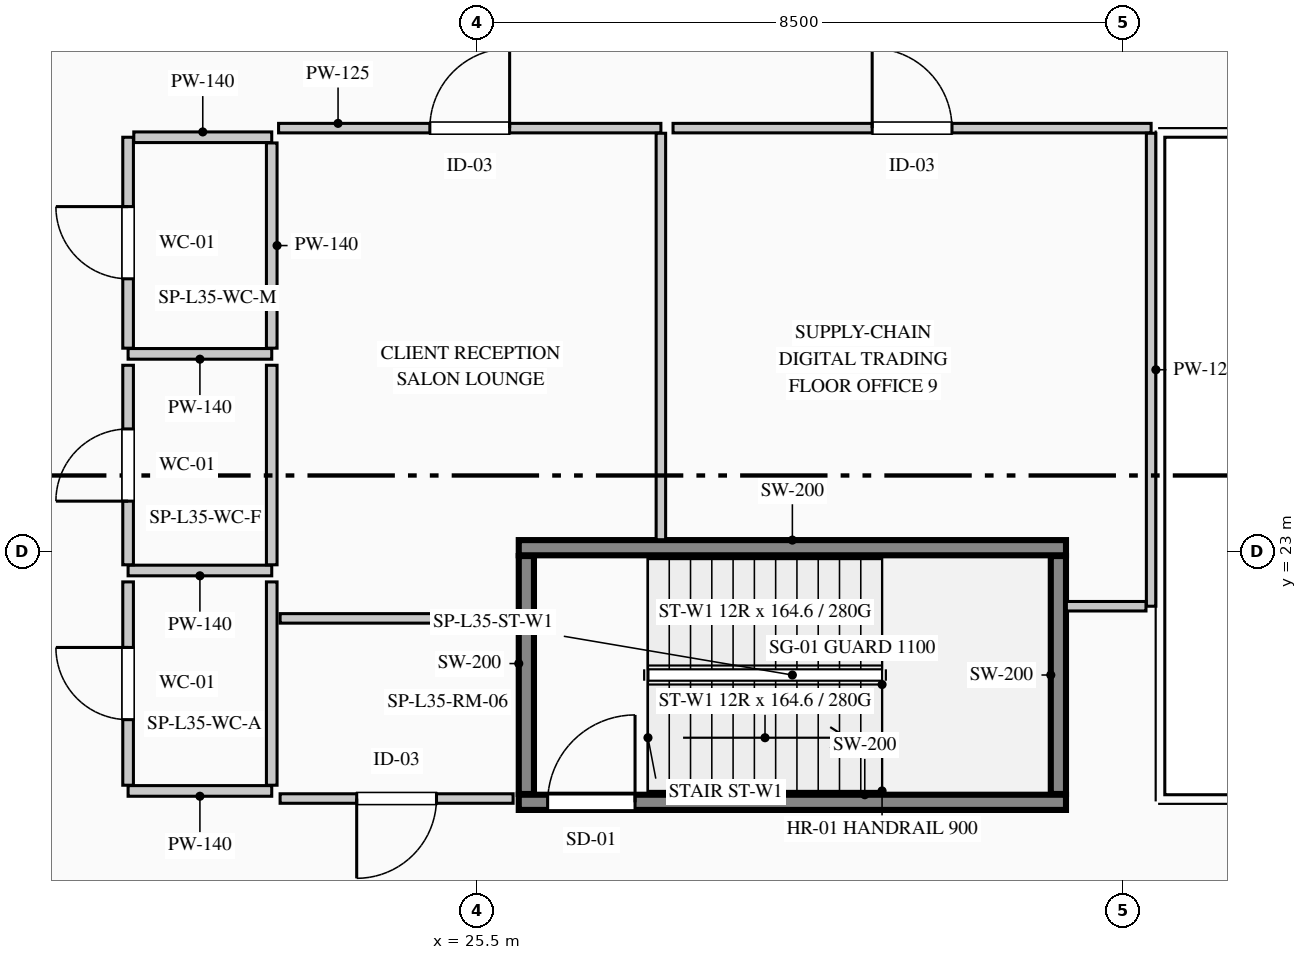
"""IFC4 building model, lengths in metres.
Left out: names, types, materials, properties, quantities, classifications, styles, units other than length and angle.
Written with IfcOpenShell. Run it as: python <this file> out.ifc"""

import sys

from ifc_helpers import new_model, si_unit, direction, frame, frame_2d, origin, place, context, subcontext, project, spatial, rectangle, extrude, element, fill, save


model = new_model("IFC4")
c1 = context("Model", 3, precision=1e-05, world=origin(), true_north=direction((0.0, 1.0)))
c2 = subcontext(c1, "Body", "Model", "MODEL_VIEW")
j1 = project(units=[si_unit("LENGTHUNIT", "METRE"), si_unit("PLANEANGLEUNIT", "RADIAN")], contexts=[c1])
p1 = place(None, origin())
s1 = spatial("IfcSite", under=j1, at=p1, CompositionType="ELEMENT")
p2 = place(p1, origin())
s2 = spatial("IfcBuilding", under=s1, at=p2, CompositionType="ELEMENT")
p3 = place(p2, frame((0.0, 0.0, 150.9)))
s3 = spatial("IfcBuildingStorey", under=s2, at=p3, CompositionType="ELEMENT", Elevation=150.9)
p4 = place(p3, frame((26.05, 19.7, 0.0), z_axis=(0.0, 0.0, 1.0), x_axis=(1.0, 0.0, 0.0)))
e1 = element("IfcWall", 1, at=p4, inside=s3, PredefinedType="SHEAR", context=c2, shape_type="SweptSolid", body=[
    extrude(rectangle(XDim=7.2, YDim=0.2, at=frame_2d((3.6, 0.0))), origin(), (0.0, 0.0, 1.0), 3.95),
])
p5 = place(p4, frame((0.38, 0.0, 0.0)))
e2 = element("IfcOpeningElement", 2, at=p5, cuts=e1, PredefinedType="OPENING", context=c2, shape_type="SweptSolid", body=[
    extrude(rectangle(XDim=1.15, YDim=2.2, at=frame_2d((0.575, 1.1))), frame((0.0, 0.11, 0.0), z_axis=(0.0, -1.0, 0.0), x_axis=(1.0, 0.0, 0.0)), (0.0, 0.0, 1.0), 0.22),
])
p6 = place(p3, frame((26.05, 23.05, 0.0), z_axis=(0.0, 0.0, 1.0), x_axis=(1.0, 0.0, 0.0)))
e3 = element("IfcWall", 3, at=p6, inside=s3, PredefinedType="SHEAR", context=c2, shape_type="SweptSolid", body=[
    extrude(rectangle(XDim=7.2, YDim=0.2, at=frame_2d((3.6, 0.0))), origin(), (0.0, 0.0, 1.0), 3.95),
])
for number, where, z_axis, x_axis in (
    (4, (26.15, 19.81, 0.0), (0.0, 0.0, 1.0), (0.0, 1.0, 0.0)),
    (5, (33.15, 19.81, 0.0), (0.0, 0.0, 1.0), (0.0, 1.0, 0.0)),
):
    element("IfcWall", number, at=place(p3, frame(where, z_axis=z_axis, x_axis=x_axis)), inside=s3, PredefinedType="SHEAR", context=c2, shape_type="SweptSolid", body=[
        extrude(rectangle(XDim=3.13, YDim=0.2, at=frame_2d((1.565, 0.0))), origin(), (0.0, 0.0, 1.0), 3.95),
    ])
p7 = place(p3, frame((22.8, 25.6, 0.0), z_axis=(0.0, 0.0, 1.0), x_axis=(-1.0, 0.0, 0.0)))
e6 = element("IfcWall", 6, at=p7, inside=s3, PredefinedType="PARTITIONING", context=c2, shape_type="SweptSolid", body=[
    extrude(rectangle(XDim=1.89, YDim=0.14, at=frame_2d((0.945, 0.0))), origin(), (0.0, 0.0, 1.0), 3.69),
])
p8 = place(p3, frame((20.91, 25.675, 0.0), z_axis=(0.0, 0.0, 1.0), x_axis=(0.0, 1.0, 0.0)))
e7 = element("IfcWall", 7, at=p8, inside=s3, PredefinedType="PARTITIONING", context=c2, shape_type="SweptSolid", body=[
    extrude(rectangle(XDim=2.775, YDim=0.14, at=frame_2d((1.387, 0.0))), origin(), (0.0, 0.0, 1.0), 3.69),
])
p9 = place(p8, frame((0.913, 0.0, 0.0)))
e8 = element("IfcOpeningElement", 8, at=p9, cuts=e7, PredefinedType="OPENING", context=c2, shape_type="SweptSolid", body=[
    extrude(rectangle(XDim=0.95, YDim=2.15, at=frame_2d((0.475, 1.075))), frame((0.0, 0.08, 0.0), z_axis=(0.0, -1.0, 0.0), x_axis=(1.0, 0.0, 0.0)), (0.0, 0.0, 1.0), 0.16),
])
p10 = place(p3, frame((20.985, 28.45, 0.0), z_axis=(0.0, 0.0, 1.0), x_axis=(1.0, 0.0, 0.0)))
e9 = element("IfcWall", 9, at=p10, inside=s3, PredefinedType="PARTITIONING", context=c2, shape_type="SweptSolid", body=[
    extrude(rectangle(XDim=1.815, YDim=0.14, at=frame_2d((0.907, 0.0))), origin(), (0.0, 0.0, 1.0), 3.69),
])
p11 = place(p3, frame((22.8, 28.375, 0.0), z_axis=(0.0, 0.0, 1.0), x_axis=(0.0, -1.0, 0.0)))
e10 = element("IfcWall", 10, at=p11, inside=s3, PredefinedType="PARTITIONING", context=c2, shape_type="SweptSolid", body=[
    extrude(rectangle(XDim=2.7, YDim=0.14, at=frame_2d((1.35, 0.0))), origin(), (0.0, 0.0, 1.0), 3.315),
])
p12 = place(p3, frame((22.8, 22.75, 0.0), z_axis=(0.0, 0.0, 1.0), x_axis=(-1.0, 0.0, 0.0)))
e11 = element("IfcWall", 11, at=p12, inside=s3, PredefinedType="PARTITIONING", context=c2, shape_type="SweptSolid", body=[
    extrude(rectangle(XDim=1.89, YDim=0.14, at=frame_2d((0.945, 0.0))), origin(), (0.0, 0.0, 1.0), 3.69),
])
p13 = place(p3, frame((20.91, 22.825, 0.0), z_axis=(0.0, 0.0, 1.0), x_axis=(0.0, 1.0, 0.0)))
e12 = element("IfcWall", 12, at=p13, inside=s3, PredefinedType="PARTITIONING", context=c2, shape_type="SweptSolid", body=[
    extrude(rectangle(XDim=2.625, YDim=0.14, at=frame_2d((1.312, 0.0))), origin(), (0.0, 0.0, 1.0), 3.69),
])
p14 = place(p13, frame((0.837, 0.0, 0.0)))
e13 = element("IfcOpeningElement", 13, at=p14, cuts=e12, PredefinedType="OPENING", context=c2, shape_type="SweptSolid", body=[
    extrude(rectangle(XDim=0.95, YDim=2.15, at=frame_2d((0.475, 1.075))), frame((0.0, 0.08, 0.0), z_axis=(0.0, -1.0, 0.0), x_axis=(1.0, 0.0, 0.0)), (0.0, 0.0, 1.0), 0.16),
])
p15 = place(p3, frame((22.8, 25.45, 0.0), z_axis=(0.0, 0.0, 1.0), x_axis=(0.0, -1.0, 0.0)))
e14 = element("IfcWall", 14, at=p15, inside=s3, PredefinedType="PARTITIONING", context=c2, shape_type="SweptSolid", body=[
    extrude(rectangle(XDim=2.625, YDim=0.14, at=frame_2d((1.312, 0.0))), origin(), (0.0, 0.0, 1.0), 3.315),
])
p16 = place(p3, frame((22.8, 19.85, 0.0), z_axis=(0.0, 0.0, 1.0), x_axis=(-1.0, 0.0, 0.0)))
e15 = element("IfcWall", 15, at=p16, inside=s3, PredefinedType="PARTITIONING", context=c2, shape_type="SweptSolid", body=[
    extrude(rectangle(XDim=1.89, YDim=0.14, at=frame_2d((0.945, 0.0))), origin(), (0.0, 0.0, 1.0), 3.69),
])
p17 = place(p3, frame((20.91, 19.925, 0.0), z_axis=(0.0, 0.0, 1.0), x_axis=(0.0, 1.0, 0.0)))
e16 = element("IfcWall", 16, at=p17, inside=s3, PredefinedType="PARTITIONING", context=c2, shape_type="SweptSolid", body=[
    extrude(rectangle(XDim=2.675, YDim=0.14, at=frame_2d((1.337, 0.0))), origin(), (0.0, 0.0, 1.0), 3.69),
])
p18 = place(p17, frame((0.863, 0.0, 0.0)))
e17 = element("IfcOpeningElement", 17, at=p18, cuts=e16, PredefinedType="OPENING", context=c2, shape_type="SweptSolid", body=[
    extrude(rectangle(XDim=0.95, YDim=2.15, at=frame_2d((0.475, 1.075))), frame((0.0, 0.08, 0.0), z_axis=(0.0, -1.0, 0.0), x_axis=(1.0, 0.0, 0.0)), (0.0, 0.0, 1.0), 0.16),
])
p19 = place(p3, frame((22.8, 22.6, 0.0), z_axis=(0.0, 0.0, 1.0), x_axis=(0.0, -1.0, 0.0)))
e18 = element("IfcWall", 18, at=p19, inside=s3, PredefinedType="PARTITIONING", context=c2, shape_type="SweptSolid", body=[
    extrude(rectangle(XDim=2.675, YDim=0.14, at=frame_2d((1.337, 0.0))), origin(), (0.0, 0.0, 1.0), 3.315),
])
p20 = place(p3, frame((25.976, 19.75, 0.0), z_axis=(0.0, 0.0, 1.0), x_axis=(-1.0, 0.0, 0.0)))
e19 = element("IfcWall", 19, at=p20, inside=s3, PredefinedType="PARTITIONING", context=c2, shape_type="SweptSolid", body=[
    extrude(rectangle(XDim=3.066, YDim=0.125, at=frame_2d((1.533, 0.0))), origin(), (0.0, 0.0, 1.0), 3.69),
])
p21 = place(p20, frame((1.008, 0.0, 0.0)))
e20 = element("IfcOpeningElement", 20, at=p21, cuts=e19, PredefinedType="OPENING", context=c2, shape_type="SweptSolid", body=[
    extrude(rectangle(XDim=1.05, YDim=2.15, at=frame_2d((0.525, 1.075))), frame((0.0, 0.073, 0.0), z_axis=(0.0, -1.0, 0.0), x_axis=(1.0, 0.0, 0.0)), (0.0, 0.0, 1.0), 0.145),
])
p22 = place(p3, frame((22.91, 22.12, 0.0), z_axis=(0.0, 0.0, 1.0), x_axis=(1.0, 0.0, 0.0)))
e21 = element("IfcWall", 21, at=p22, inside=s3, PredefinedType="PARTITIONING", context=c2, shape_type="SweptSolid", body=[
    extrude(rectangle(XDim=3.135, YDim=0.125, at=frame_2d((1.567, 0.0))), origin(), (0.0, 0.0, 1.0), 3.69),
])
p23 = place(p3, frame((22.89, 28.57, 0.0), z_axis=(0.0, 0.0, 1.0), x_axis=(1.0, 0.0, 0.0)))
e22 = element("IfcWall", 22, at=p23, inside=s3, PredefinedType="PARTITIONING", context=c2, shape_type="SweptSolid", body=[
    extrude(rectangle(XDim=5.03, YDim=0.125, at=frame_2d((2.515, 0.0))), origin(), (0.0, 0.0, 1.0), 3.475),
])
p24 = place(p23, frame((1.99, 0.0, 0.0)))
e23 = element("IfcOpeningElement", 23, at=p24, cuts=e22, PredefinedType="OPENING", context=c2, shape_type="SweptSolid", body=[
    extrude(rectangle(XDim=1.05, YDim=2.15, at=frame_2d((0.525, 1.075))), frame((0.0, 0.073, 0.0), z_axis=(0.0, -1.0, 0.0), x_axis=(1.0, 0.0, 0.0)), (0.0, 0.0, 1.0), 0.145),
])
p25 = place(p3, frame((27.92, 28.502, 0.0), z_axis=(0.0, 0.0, 1.0), x_axis=(0.0, -1.0, 0.0)))
e24 = element("IfcWall", 24, at=p25, inside=s3, PredefinedType="PARTITIONING", context=c2, shape_type="SweptSolid", body=[
    extrude(rectangle(XDim=5.347, YDim=0.125, at=frame_2d((2.674, 0.0))), origin(), (0.0, 0.0, 1.0), 3.69),
])
p26 = place(p3, frame((28.08, 28.57, 0.0), z_axis=(0.0, 0.0, 1.0), x_axis=(1.0, 0.0, 0.0)))
e25 = element("IfcWall", 25, at=p26, inside=s3, PredefinedType="PARTITIONING", context=c2, shape_type="SweptSolid", body=[
    extrude(rectangle(XDim=6.29, YDim=0.125, at=frame_2d((3.145, 0.0))), origin(), (0.0, 0.0, 1.0), 3.475),
])
p27 = place(p26, frame((2.62, 0.0, 0.0)))
e26 = element("IfcOpeningElement", 26, at=p27, cuts=e25, PredefinedType="OPENING", context=c2, shape_type="SweptSolid", body=[
    extrude(rectangle(XDim=1.05, YDim=2.15, at=frame_2d((0.525, 1.075))), frame((0.0, 0.073, 0.0), z_axis=(0.0, -1.0, 0.0), x_axis=(1.0, 0.0, 0.0)), (0.0, 0.0, 1.0), 0.145),
])
p28 = place(p3, frame((34.37, 28.502, 0.0), z_axis=(0.0, 0.0, 1.0), x_axis=(0.0, -1.0, 0.0)))
e27 = element("IfcWall", 27, at=p28, inside=s3, PredefinedType="PARTITIONING", context=c2, shape_type="SweptSolid", body=[
    extrude(rectangle(XDim=6.222, YDim=0.125, at=frame_2d((3.111, 0.0))), origin(), (0.0, 0.0, 1.0), 3.69),
])
p29 = place(p3, frame((34.302, 22.28, 0.0), z_axis=(0.0, 0.0, 1.0), x_axis=(-1.0, 0.0, 0.0)))
e28 = element("IfcWall", 28, at=p29, inside=s3, PredefinedType="PARTITIONING", context=c2, shape_type="SweptSolid", body=[
    extrude(rectangle(XDim=1.048, YDim=0.125, at=frame_2d((0.524, 0.0))), origin(), (0.0, 0.0, 1.0), 3.69),
])
p30 = place(p5, origin())
e29 = element("IfcDoor", 29, at=p30, inside=s3, OperationType="SINGLE_SWING_RIGHT", PredefinedType="DOOR", context=c2, shape_type="SweptSolid", body=[
    extrude(rectangle(XDim=1.15, YDim=2.2, at=frame_2d((0.575, 1.1))), frame((0.0, 0.025, 0.0), z_axis=(0.0, -1.0, 0.0), x_axis=(1.0, 0.0, 0.0)), (0.0, 0.0, 1.0), 0.05),
])
fill(e2, e29)
p31 = place(p9, origin())
e30 = element("IfcDoor", 30, at=p31, inside=s3, OperationType="SINGLE_SWING_RIGHT", PredefinedType="DOOR", context=c2, shape_type="SweptSolid", body=[
    extrude(rectangle(XDim=0.95, YDim=2.15, at=frame_2d((0.475, 1.075))), frame((0.0, 0.025, 0.0), z_axis=(0.0, -1.0, 0.0), x_axis=(1.0, 0.0, 0.0)), (0.0, 0.0, 1.0), 0.05),
])
fill(e8, e30)
p32 = place(p14, origin())
e31 = element("IfcDoor", 31, at=p32, inside=s3, OperationType="SINGLE_SWING_LEFT", PredefinedType="DOOR", context=c2, shape_type="SweptSolid", body=[
    extrude(rectangle(XDim=0.95, YDim=2.15, at=frame_2d((0.475, 1.075))), frame((0.0, 0.025, 0.0), z_axis=(0.0, -1.0, 0.0), x_axis=(1.0, 0.0, 0.0)), (0.0, 0.0, 1.0), 0.05),
])
fill(e13, e31)
p33 = place(p18, origin())
e32 = element("IfcDoor", 32, at=p33, inside=s3, OperationType="SINGLE_SWING_RIGHT", PredefinedType="DOOR", context=c2, shape_type="SweptSolid", body=[
    extrude(rectangle(XDim=0.95, YDim=2.15, at=frame_2d((0.475, 1.075))), frame((0.0, 0.025, 0.0), z_axis=(0.0, -1.0, 0.0), x_axis=(1.0, 0.0, 0.0)), (0.0, 0.0, 1.0), 0.05),
])
fill(e17, e32)
p34 = place(p21, origin())
e33 = element("IfcDoor", 33, at=p34, inside=s3, OperationType="SINGLE_SWING_RIGHT", PredefinedType="DOOR", context=c2, shape_type="SweptSolid", body=[
    extrude(rectangle(XDim=1.05, YDim=2.15, at=frame_2d((0.525, 1.075))), frame((0.0, 0.025, 0.0), z_axis=(0.0, -1.0, 0.0), x_axis=(1.0, 0.0, 0.0)), (0.0, 0.0, 1.0), 0.05),
])
fill(e20, e33)
p35 = place(p24, origin())
e34 = element("IfcDoor", 34, at=p35, inside=s3, OperationType="SINGLE_SWING_RIGHT", PredefinedType="DOOR", context=c2, shape_type="SweptSolid", body=[
    extrude(rectangle(XDim=1.05, YDim=2.15, at=frame_2d((0.525, 1.075))), frame((0.0, 0.025, 0.0), z_axis=(0.0, -1.0, 0.0), x_axis=(1.0, 0.0, 0.0)), (0.0, 0.0, 1.0), 0.05),
])
fill(e23, e34)
p36 = place(p27, origin())
e35 = element("IfcDoor", 35, at=p36, inside=s3, OperationType="SINGLE_SWING_LEFT", PredefinedType="DOOR", context=c2, shape_type="SweptSolid", body=[
    extrude(rectangle(XDim=1.05, YDim=2.15, at=frame_2d((0.525, 1.075))), frame((0.0, 0.025, 0.0), z_axis=(0.0, -1.0, 0.0), x_axis=(1.0, 0.0, 0.0)), (0.0, 0.0, 1.0), 0.05),
])
fill(e26, e35)
save(model, sys.argv[1])
